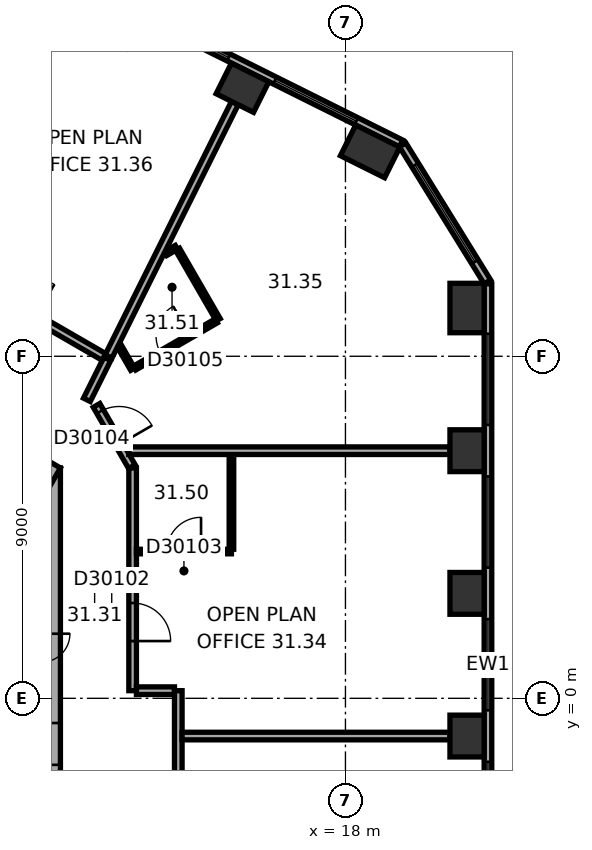
"""IFC4 building model, lengths in metres.
Left out: names, types, materials, properties, quantities, classifications, styles, units other than length and angle.
Written with IfcOpenShell. Run it as: python <this file> out.ifc"""

import sys

from ifc_helpers import new_model, si_unit, direction, frame, frame_2d, origin, origin_2d, place, context, subcontext, project, spatial, rectangle, extrude, element, fill, save


model = new_model("IFC4")
c1 = context("Model", 3, precision=1e-05, world=origin(), true_north=direction((0.0, 1.0)))
c2 = subcontext(c1, "Body", "Model", "MODEL_VIEW")
j1 = project(units=[si_unit("LENGTHUNIT", "METRE"), si_unit("PLANEANGLEUNIT", "RADIAN")], contexts=[c1])
p1 = place(None, origin())
s1 = spatial("IfcSite", under=j1, at=p1, CompositionType="ELEMENT")
p2 = place(p1, origin())
s2 = spatial("IfcBuilding", under=s1, at=p2, CompositionType="ELEMENT")
p3 = place(p2, frame((0.0, 0.0, 128.1)))
s3 = spatial("IfcBuildingStorey", under=s2, at=p3, CompositionType="ELEMENT", Elevation=128.1)
for number, where, z_axis, x_axis in (
    (1, (21.2, -0.993, 0.0), (0.0, 0.0, 1.0), (0.0, 1.0, 0.0)),
    (2, (21.2, 2.761, 0.0), (0.0, 0.0, 1.0), (0.0, 1.0, 0.0)),
    (3, (21.2, 6.515, 0.0), (0.0, 0.0, 1.0), (0.0, 1.0, 0.0)),
):
    element("IfcColumn", number, at=place(p3, frame(where, z_axis=z_axis, x_axis=x_axis)), inside=s3, PredefinedType="COLUMN", context=c2, shape_type="SweptSolid", body=[
        extrude(rectangle(XDim=1.1, YDim=0.9, at=origin_2d()), origin(), (0.0, 0.0, 1.0), 3.7),
    ])
for number, where, z_axis, x_axis in (
    (4, (21.2, 10.27, 0.0), (0.0, 0.0, 1.0), (0.0, 1.0, 0.0)),
    (5, (18.65, 14.39, 0.0), (0.0, 0.0, 1.0), (-0.895, 0.446, 0.0)),
):
    element("IfcColumn", number, at=place(p3, frame(where, z_axis=z_axis, x_axis=x_axis)), inside=s3, PredefinedType="COLUMN", context=c2, shape_type="SweptSolid", body=[
        extrude(rectangle(XDim=1.3, YDim=0.9, at=origin_2d()), origin(), (0.0, 0.0, 1.0), 3.7),
    ])
p4 = place(p3, frame((15.29, 16.065, 0.0), z_axis=(0.0, 0.0, 1.0), x_axis=(-0.894934361602, 0.44619781311, 0.0)))
e6 = element("IfcColumn", 6, at=p4, inside=s3, PredefinedType="COLUMN", context=c2, shape_type="SweptSolid", body=[
    extrude(rectangle(XDim=1.1, YDim=0.9, at=origin_2d()), origin(), (0.0, 0.0, 1.0), 3.7),
])
p5 = place(p3, frame((10.0, -6.062, 0.0), z_axis=(0.0, 0.0, 1.0), x_axis=(0.0, 1.0, 0.0)))
e7 = element("IfcWall", 7, at=p5, inside=s3, PredefinedType="SHEAR", context=c2, shape_type="SweptSolid", body=[
    extrude(rectangle(XDim=12.125, YDim=1.0, at=frame_2d((6.062, 0.0))), origin(), (0.0, 0.0, 1.0), 3.7),
])
p6 = place(p5, frame((6.262, 0.0, 0.0)))
e8 = element("IfcOpeningElement", 8, at=p6, cuts=e7, PredefinedType="OPENING", context=c2, shape_type="SweptSolid", body=[
    extrude(rectangle(XDim=1.5, YDim=2.1, at=frame_2d((0.75, 1.05))), frame((0.0, 0.51, 0.0), z_axis=(0.0, -1.0, 0.0), x_axis=(1.0, 0.0, 0.0)), (0.0, 0.0, 1.0), 1.02),
])
p7 = place(p5, frame((1.712, 0.0, 0.0)))
e9 = element("IfcOpeningElement", 9, at=p7, cuts=e7, PredefinedType="OPENING", context=c2, shape_type="SweptSolid", body=[
    extrude(rectangle(XDim=1.1, YDim=2.1, at=frame_2d((0.55, 1.05))), frame((0.0, 0.51, 0.0), z_axis=(0.0, -1.0, 0.0), x_axis=(1.0, 0.0, 0.0)), (0.0, 0.0, 1.0), 1.02),
])
p8 = place(p5, frame((4.312, 0.0, 0.0)))
e10 = element("IfcOpeningElement", 10, at=p8, cuts=e7, PredefinedType="OPENING", context=c2, shape_type="SweptSolid", body=[
    extrude(rectangle(XDim=1.1, YDim=2.1, at=frame_2d((0.55, 1.05))), frame((0.0, 0.51, 0.0), z_axis=(0.0, -1.0, 0.0), x_axis=(1.0, 0.0, 0.0)), (0.0, 0.0, 1.0), 1.02),
])
p9 = place(p3, frame((10.25, 5.629, 0.0), z_axis=(0.0, 0.0, 1.0), x_axis=(-0.866022616891, 0.50000482701, 0.0)))
e11 = element("IfcWall", 11, at=p9, inside=s3, PredefinedType="SHEAR", context=c2, shape_type="SweptSolid", body=[
    extrude(rectangle(XDim=12.125, YDim=1.0, at=frame_2d((6.062, 0.0))), origin(), (0.0, 0.0, 1.0), 3.7),
])
p10 = place(p9, frame((2.612, 0.0, 0.0)))
e12 = element("IfcOpeningElement", 12, at=p10, cuts=e11, PredefinedType="OPENING", context=c2, shape_type="SweptSolid", body=[
    extrude(rectangle(XDim=1.1, YDim=2.1, at=frame_2d((0.55, 1.05))), frame((0.0, 0.51, 0.0), z_axis=(0.0, -1.0, 0.0), x_axis=(1.0, 0.0, 0.0)), (0.0, 0.0, 1.0), 1.02),
])
p11 = place(p9, frame((5.212, 0.0, 0.0)))
e13 = element("IfcOpeningElement", 13, at=p11, cuts=e11, PredefinedType="OPENING", context=c2, shape_type="SweptSolid", body=[
    extrude(rectangle(XDim=1.1, YDim=2.1, at=frame_2d((0.55, 1.05))), frame((0.0, 0.51, 0.0), z_axis=(0.0, -1.0, 0.0), x_axis=(1.0, 0.0, 0.0)), (0.0, 0.0, 1.0), 1.02),
])
p12 = place(p9, frame((7.812, 0.0, 0.0)))
e14 = element("IfcOpeningElement", 14, at=p12, cuts=e11, PredefinedType="OPENING", context=c2, shape_type="SweptSolid", body=[
    extrude(rectangle(XDim=1.1, YDim=2.1, at=frame_2d((0.55, 1.05))), frame((0.0, 0.51, 0.0), z_axis=(0.0, -1.0, 0.0), x_axis=(1.0, 0.0, 0.0)), (0.0, 0.0, 1.0), 1.02),
])
p13 = place(p3, frame((21.75, -9.138, 0.0), z_axis=(0.0, 0.0, 1.0), x_axis=(0.0, 1.0, 0.0)))
e15 = element("IfcWall", 15, at=p13, inside=s3, PredefinedType="STANDARD", context=c2, shape_type="SweptSolid", body=[
    extrude(rectangle(XDim=20.044, YDim=0.2, at=frame_2d((10.022, 0.0))), origin(), (0.0, 0.0, 1.0), 3.7),
])
p14 = place(p13, frame((1.314, 0.0, 0.9)))
e16 = element("IfcOpeningElement", 16, at=p14, cuts=e15, PredefinedType="OPENING", context=c2, shape_type="SweptSolid", body=[
    extrude(rectangle(XDim=2.4, YDim=2.0, at=frame_2d((1.2, 1.0))), frame((0.0, 0.11, 0.0), z_axis=(0.0, -1.0, 0.0), x_axis=(1.0, 0.0, 0.0)), (0.0, 0.0, 1.0), 0.22),
])
p15 = place(p13, frame((5.069, 0.0, 0.9)))
e17 = element("IfcOpeningElement", 17, at=p15, cuts=e15, PredefinedType="OPENING", context=c2, shape_type="SweptSolid", body=[
    extrude(rectangle(XDim=2.4, YDim=2.0, at=frame_2d((1.2, 1.0))), frame((0.0, 0.11, 0.0), z_axis=(0.0, -1.0, 0.0), x_axis=(1.0, 0.0, 0.0)), (0.0, 0.0, 1.0), 0.22),
])
p16 = place(p13, frame((8.823, 0.0, 0.9)))
e18 = element("IfcOpeningElement", 18, at=p16, cuts=e15, PredefinedType="OPENING", context=c2, shape_type="SweptSolid", body=[
    extrude(rectangle(XDim=2.4, YDim=2.0, at=frame_2d((1.2, 1.0))), frame((0.0, 0.11, 0.0), z_axis=(0.0, -1.0, 0.0), x_axis=(1.0, 0.0, 0.0)), (0.0, 0.0, 1.0), 0.22),
])
p17 = place(p13, frame((12.577, 0.0, 0.9)))
e19 = element("IfcOpeningElement", 19, at=p17, cuts=e15, PredefinedType="OPENING", context=c2, shape_type="SweptSolid", body=[
    extrude(rectangle(XDim=2.4, YDim=2.0, at=frame_2d((1.2, 1.0))), frame((0.0, 0.11, 0.0), z_axis=(0.0, -1.0, 0.0), x_axis=(1.0, 0.0, 0.0)), (0.0, 0.0, 1.0), 0.22),
])
p18 = place(p13, frame((16.331, 0.0, 0.9)))
e20 = element("IfcOpeningElement", 20, at=p18, cuts=e15, PredefinedType="OPENING", context=c2, shape_type="SweptSolid", body=[
    extrude(rectangle(XDim=2.4, YDim=2.0, at=frame_2d((1.2, 1.0))), frame((0.0, 0.11, 0.0), z_axis=(0.0, -1.0, 0.0), x_axis=(1.0, 0.0, 0.0)), (0.0, 0.0, 1.0), 0.22),
])
p19 = place(p3, frame((21.735, 10.958, 0.0), z_axis=(0.0, 0.0, 1.0), x_axis=(-0.526213807775, 0.850352296702, 0.0)))
e21 = element("IfcWall", 21, at=p19, inside=s3, PredefinedType="STANDARD", context=c2, shape_type="SweptSolid", body=[
    extrude(rectangle(XDim=4.238, YDim=0.2, at=frame_2d((2.119, 0.0))), origin(), (0.0, 0.0, 1.0), 3.7),
])
p20 = place(p19, frame((0.619, 0.0, 0.9)))
e22 = element("IfcOpeningElement", 22, at=p20, cuts=e21, PredefinedType="OPENING", context=c2, shape_type="SweptSolid", body=[
    extrude(rectangle(XDim=3.0, YDim=2.0, at=frame_2d((1.5, 1.0))), frame((0.0, 0.11, 0.0), z_axis=(0.0, -1.0, 0.0), x_axis=(1.0, 0.0, 0.0)), (0.0, 0.0, 1.0), 0.22),
])
p21 = place(p3, frame((19.464, 14.599, 0.0), z_axis=(0.0, 0.0, 1.0), x_axis=(-0.894935755043, 0.446195018289, 0.0)))
e23 = element("IfcWall", 23, at=p21, inside=s3, PredefinedType="STANDARD", context=c2, shape_type="SweptSolid", body=[
    extrude(rectangle(XDim=20.044, YDim=0.2, at=frame_2d((10.022, 0.0))), origin(), (0.0, 0.0, 1.0), 3.7),
])
p22 = place(p21, frame((1.313, 0.0, 0.9)))
e24 = element("IfcOpeningElement", 24, at=p22, cuts=e23, PredefinedType="OPENING", context=c2, shape_type="SweptSolid", body=[
    extrude(rectangle(XDim=2.4, YDim=2.0, at=frame_2d((1.2, 1.0))), frame((0.0, 0.11, 0.0), z_axis=(0.0, -1.0, 0.0), x_axis=(1.0, 0.0, 0.0)), (0.0, 0.0, 1.0), 0.22),
])
p23 = place(p21, frame((5.067, 0.0, 0.9)))
e25 = element("IfcOpeningElement", 25, at=p23, cuts=e23, PredefinedType="OPENING", context=c2, shape_type="SweptSolid", body=[
    extrude(rectangle(XDim=2.4, YDim=2.0, at=frame_2d((1.2, 1.0))), frame((0.0, 0.11, 0.0), z_axis=(0.0, -1.0, 0.0), x_axis=(1.0, 0.0, 0.0)), (0.0, 0.0, 1.0), 0.22),
])
p24 = place(p21, frame((8.821, 0.0, 0.9)))
e26 = element("IfcOpeningElement", 26, at=p24, cuts=e23, PredefinedType="OPENING", context=c2, shape_type="SweptSolid", body=[
    extrude(rectangle(XDim=2.4, YDim=2.0, at=frame_2d((1.2, 1.0))), frame((0.0, 0.11, 0.0), z_axis=(0.0, -1.0, 0.0), x_axis=(1.0, 0.0, 0.0)), (0.0, 0.0, 1.0), 0.22),
])
p25 = place(p21, frame((12.575, 0.0, 0.9)))
e27 = element("IfcOpeningElement", 27, at=p25, cuts=e23, PredefinedType="OPENING", context=c2, shape_type="SweptSolid", body=[
    extrude(rectangle(XDim=2.4, YDim=2.0, at=frame_2d((1.2, 1.0))), frame((0.0, 0.11, 0.0), z_axis=(0.0, -1.0, 0.0), x_axis=(1.0, 0.0, 0.0)), (0.0, 0.0, 1.0), 0.22),
])
p26 = place(p21, frame((16.329, 0.0, 0.9)))
e28 = element("IfcOpeningElement", 28, at=p26, cuts=e23, PredefinedType="OPENING", context=c2, shape_type="SweptSolid", body=[
    extrude(rectangle(XDim=2.4, YDim=2.0, at=frame_2d((1.2, 1.0))), frame((0.0, 0.11, 0.0), z_axis=(0.0, -1.0, 0.0), x_axis=(1.0, 0.0, 0.0)), (0.0, 0.0, 1.0), 0.22),
])
p27 = place(p3, frame((11.196, 7.854, 0.0), z_axis=(0.0, 0.0, 1.0), x_axis=(0.446241040303, 0.894912808015, 0.0)))
e29 = element("IfcWall", 29, at=p27, inside=s3, PredefinedType="PARTITIONING", context=c2, shape_type="SweptSolid", body=[
    extrude(rectangle(XDim=1.205, YDim=0.2, at=frame_2d((0.603, 0.0))), origin(), (0.0, 0.0, 1.0), 3.42),
])
p28 = place(p3, frame((11.646, 8.981, 0.0), z_axis=(0.0, 0.0, 1.0), x_axis=(-0.866027142779, 0.499996987961, 0.0)))
e30 = element("IfcWall", 30, at=p28, inside=s3, PredefinedType="PARTITIONING", context=c2, shape_type="SweptSolid", body=[
    extrude(rectangle(XDim=9.597, YDim=0.2, at=frame_2d((4.798, 0.0))), origin(), (0.0, 0.0, 1.0), 3.42),
])
p29 = place(p28, frame((2.086, 0.0, 0.0)))
e31 = element("IfcOpeningElement", 31, at=p29, cuts=e30, PredefinedType="OPENING", context=c2, shape_type="SweptSolid", body=[
    extrude(rectangle(XDim=1.0, YDim=2.1, at=frame_2d((0.5, 1.05))), frame((0.0, 0.11, 0.0), z_axis=(0.0, -1.0, 0.0), x_axis=(1.0, 0.0, 0.0)), (0.0, 0.0, 1.0), 0.22),
])
p30 = place(p28, frame((8.01, 0.0, 0.0)))
e32 = element("IfcOpeningElement", 32, at=p30, cuts=e30, PredefinedType="OPENING", context=c2, shape_type="SweptSolid", body=[
    extrude(rectangle(XDim=1.0, YDim=2.1, at=frame_2d((0.5, 1.05))), frame((0.0, 0.11, 0.0), z_axis=(0.0, -1.0, 0.0), x_axis=(1.0, 0.0, 0.0)), (0.0, 0.0, 1.0), 0.22),
])
p31 = place(p3, frame((12.38, 6.097, 0.0), z_axis=(0.0, 0.0, 1.0), x_axis=(-0.499964847546, 0.866045698112, 0.0)))
e33 = element("IfcWall", 33, at=p31, inside=s3, PredefinedType="PARTITIONING", context=c2, shape_type="SweptSolid", body=[
    extrude(rectangle(XDim=1.86, YDim=0.2, at=frame_2d((0.93, 0.0))), origin(), (0.0, 0.0, 1.0), 3.42),
])
p32 = place(p31, frame((0.672, 0.0, 0.0)))
e34 = element("IfcOpeningElement", 34, at=p32, cuts=e33, PredefinedType="OPENING", context=c2, shape_type="SweptSolid", body=[
    extrude(rectangle(XDim=1.0, YDim=2.1, at=frame_2d((0.5, 1.05))), frame((0.0, 0.11, 0.0), z_axis=(0.0, -1.0, 0.0), x_axis=(1.0, 0.0, 0.0)), (0.0, 0.0, 1.0), 0.22),
])
p33 = place(p3, frame((12.4, 0.201, 0.0), z_axis=(0.0, 0.0, 1.0), x_axis=(0.0, 1.0, 0.0)))
e35 = element("IfcWall", 35, at=p33, inside=s3, PredefinedType="PARTITIONING", context=c2, shape_type="SweptSolid", body=[
    extrude(rectangle(XDim=5.861, YDim=0.2, at=frame_2d((2.931, 0.0))), origin(), (0.0, 0.0, 1.0), 3.42),
])
p34 = place(p33, frame((1.306, 0.0, 0.0)))
e36 = element("IfcOpeningElement", 36, at=p34, cuts=e35, PredefinedType="OPENING", context=c2, shape_type="SweptSolid", body=[
    extrude(rectangle(XDim=1.0, YDim=2.1, at=frame_2d((0.5, 1.05))), frame((0.0, 0.11, 0.0), z_axis=(0.0, -1.0, 0.0), x_axis=(1.0, 0.0, 0.0)), (0.0, 0.0, 1.0), 0.22),
])
p35 = place(p3, frame((12.401, 8.661, 0.0), z_axis=(0.0, 0.0, 1.0), x_axis=(-0.499831418649, 0.866122712398, 0.0)))
e37 = element("IfcWall", 37, at=p35, inside=s3, PredefinedType="PARTITIONING", context=c2, shape_type="SweptSolid", body=[
    extrude(rectangle(XDim=0.711, YDim=0.12, at=frame_2d((0.355, 0.0))), origin(), (0.0, 0.0, 1.0), 3.42),
])
p36 = place(p3, frame((13.269, 11.702, 0.0), z_axis=(0.0, 0.0, 1.0), x_axis=(0.865936922628, 0.500153222552, 0.0)))
e38 = element("IfcWall", 38, at=p36, inside=s3, PredefinedType="PARTITIONING", context=c2, shape_type="SweptSolid", body=[
    extrude(rectangle(XDim=0.327, YDim=0.12, at=frame_2d((0.164, 0.0))), origin(), (0.0, 0.0, 1.0), 3.42),
])
p37 = place(p3, frame((13.501, 0.201, 0.0), z_axis=(0.0, 0.0, 1.0), x_axis=(-1.0, 0.0, 0.0)))
e39 = element("IfcWall", 39, at=p37, inside=s3, PredefinedType="PARTITIONING", context=c2, shape_type="SweptSolid", body=[
    extrude(rectangle(XDim=1.001, YDim=0.2, at=frame_2d((0.5, 0.0))), origin(), (0.0, 0.0, 1.0), 3.42),
])
p38 = place(p3, frame((13.583, 11.814, 0.0), z_axis=(0.0, 0.0, 1.0), x_axis=(0.500028586798, -0.86600889856, 0.0)))
e40 = element("IfcWall", 40, at=p38, inside=s3, PredefinedType="PARTITIONING", context=c2, shape_type="SweptSolid", body=[
    extrude(rectangle(XDim=2.14, YDim=0.12, at=frame_2d((1.07, 0.0))), origin(), (0.0, 0.0, 1.0), 3.42),
])
p39 = place(p3, frame((13.601, -5.501, 0.0), z_axis=(0.0, 0.0, 1.0), x_axis=(0.0, 1.0, 0.0)))
e41 = element("IfcWall", 41, at=p39, inside=s3, PredefinedType="PARTITIONING", context=c2, shape_type="SweptSolid", body=[
    extrude(rectangle(XDim=5.702, YDim=0.2, at=frame_2d((2.851, 0.0))), origin(), (0.0, 0.0, 1.0), 3.42),
])
p40 = place(p39, frame((2.131, 0.0, 0.0)))
e42 = element("IfcOpeningElement", 42, at=p40, cuts=e41, PredefinedType="OPENING", context=c2, shape_type="SweptSolid", body=[
    extrude(rectangle(XDim=1.0, YDim=2.1, at=frame_2d((0.5, 1.05))), frame((0.0, 0.11, 0.0), z_axis=(0.0, -1.0, 0.0), x_axis=(1.0, 0.0, 0.0)), (0.0, 0.0, 1.0), 0.22),
])
p41 = place(p3, frame((14.601, 9.931, 0.0), z_axis=(0.0, 0.0, 1.0), x_axis=(-0.866023285932, -0.50000366821, 0.0)))
e43 = element("IfcWall", 43, at=p41, inside=s3, PredefinedType="PARTITIONING", context=c2, shape_type="SweptSolid", body=[
    extrude(rectangle(XDim=2.48, YDim=0.12, at=frame_2d((1.24, 0.0))), origin(), (0.0, 0.0, 1.0), 3.42),
])
p42 = place(p41, frame((0.79, 0.0, 0.0)))
e44 = element("IfcOpeningElement", 44, at=p42, cuts=e43, PredefinedType="OPENING", context=c2, shape_type="SweptSolid", body=[
    extrude(rectangle(XDim=0.9, YDim=2.1, at=frame_2d((0.45, 1.05))), frame((0.0, 0.07, 0.0), z_axis=(0.0, -1.0, 0.0), x_axis=(1.0, 0.0, 0.0)), (0.0, 0.0, 1.0), 0.14),
])
p43 = place(p3, frame((15.0, 3.862, 0.0), z_axis=(0.0, 0.0, 1.0), x_axis=(-1.0, 0.0, 0.0)))
e45 = element("IfcWall", 45, at=p43, inside=s3, PredefinedType="PARTITIONING", context=c2, shape_type="SweptSolid", body=[
    extrude(rectangle(XDim=2.5, YDim=0.12, at=frame_2d((1.25, 0.0))), origin(), (0.0, 0.0, 1.0), 3.42),
])
p44 = place(p43, frame((0.8, 0.0, 0.0)))
e46 = element("IfcOpeningElement", 46, at=p44, cuts=e45, PredefinedType="OPENING", context=c2, shape_type="SweptSolid", body=[
    extrude(rectangle(XDim=0.9, YDim=2.1, at=frame_2d((0.45, 1.05))), frame((0.0, 0.07, 0.0), z_axis=(0.0, -1.0, 0.0), x_axis=(1.0, 0.0, 0.0)), (0.0, 0.0, 1.0), 0.14),
])
p45 = place(p3, frame((15.0, 6.415, 0.0), z_axis=(0.0, 0.0, 1.0), x_axis=(0.0, -1.0, 0.0)))
e47 = element("IfcWall", 47, at=p45, inside=s3, PredefinedType="PARTITIONING", context=c2, shape_type="SweptSolid", body=[
    extrude(rectangle(XDim=2.493, YDim=0.12, at=frame_2d((1.247, 0.0))), origin(), (0.0, 0.0, 1.0), 3.42),
])
p46 = place(p3, frame((15.09, 15.663, 0.0), z_axis=(0.0, 0.0, 1.0), x_axis=(-0.446203977428, -0.89493128816, 0.0)))
e48 = element("IfcWall", 48, at=p46, inside=s3, PredefinedType="PARTITIONING", context=c2, shape_type="SweptSolid", body=[
    extrude(rectangle(XDim=7.45, YDim=0.2, at=frame_2d((3.725, 0.0))), origin(), (0.0, 0.0, 1.0), 3.42),
])
p47 = place(p3, frame((20.75, -0.993, 0.0), z_axis=(0.0, 0.0, 1.0), x_axis=(-1.0, 0.0, 0.0)))
e49 = element("IfcWall", 49, at=p47, inside=s3, PredefinedType="PARTITIONING", context=c2, shape_type="SweptSolid", body=[
    extrude(rectangle(XDim=7.049, YDim=0.2, at=frame_2d((3.524, 0.0))), origin(), (0.0, 0.0, 1.0), 2.87),
])
p48 = place(p3, frame((20.75, 6.515, 0.0), z_axis=(0.0, 0.0, 1.0), x_axis=(-1.0, 0.0, 0.0)))
e50 = element("IfcWall", 50, at=p48, inside=s3, PredefinedType="PARTITIONING", context=c2, shape_type="SweptSolid", body=[
    extrude(rectangle(XDim=8.452, YDim=0.2, at=frame_2d((4.226, 0.0))), origin(), (0.0, 0.0, 1.0), 3.42),
])
p49 = place(p15, origin())
e51 = element("IfcWindow", 51, at=p49, inside=s3, PartitioningType="SINGLE_PANEL", PredefinedType="WINDOW", context=c2, shape_type="SweptSolid", body=[
    extrude(rectangle(XDim=2.4, YDim=2.0, at=frame_2d((1.2, 1.0))), frame((0.0, 0.03, 0.0), z_axis=(0.0, -1.0, 0.0), x_axis=(1.0, 0.0, 0.0)), (0.0, 0.0, 1.0), 0.06),
])
fill(e17, e51)
p50 = place(p16, origin())
e52 = element("IfcWindow", 52, at=p50, inside=s3, PartitioningType="SINGLE_PANEL", PredefinedType="WINDOW", context=c2, shape_type="SweptSolid", body=[
    extrude(rectangle(XDim=2.4, YDim=2.0, at=frame_2d((1.2, 1.0))), frame((0.0, 0.03, 0.0), z_axis=(0.0, -1.0, 0.0), x_axis=(1.0, 0.0, 0.0)), (0.0, 0.0, 1.0), 0.06),
])
fill(e18, e52)
p51 = place(p17, origin())
e53 = element("IfcWindow", 53, at=p51, inside=s3, PartitioningType="SINGLE_PANEL", PredefinedType="WINDOW", context=c2, shape_type="SweptSolid", body=[
    extrude(rectangle(XDim=2.4, YDim=2.0, at=frame_2d((1.2, 1.0))), frame((0.0, 0.03, 0.0), z_axis=(0.0, -1.0, 0.0), x_axis=(1.0, 0.0, 0.0)), (0.0, 0.0, 1.0), 0.06),
])
fill(e19, e53)
p52 = place(p18, origin())
e54 = element("IfcWindow", 54, at=p52, inside=s3, PartitioningType="SINGLE_PANEL", PredefinedType="WINDOW", context=c2, shape_type="SweptSolid", body=[
    extrude(rectangle(XDim=2.4, YDim=2.0, at=frame_2d((1.2, 1.0))), frame((0.0, 0.03, 0.0), z_axis=(0.0, -1.0, 0.0), x_axis=(1.0, 0.0, 0.0)), (0.0, 0.0, 1.0), 0.06),
])
fill(e20, e54)
p53 = place(p20, origin())
e55 = element("IfcWindow", 55, at=p53, inside=s3, PartitioningType="SINGLE_PANEL", PredefinedType="WINDOW", context=c2, shape_type="SweptSolid", body=[
    extrude(rectangle(XDim=3.0, YDim=2.0, at=frame_2d((1.5, 1.0))), frame((0.0, 0.03, 0.0), z_axis=(0.0, -1.0, 0.0), x_axis=(1.0, 0.0, 0.0)), (0.0, 0.0, 1.0), 0.06),
])
fill(e22, e55)
p54 = place(p22, origin())
e56 = element("IfcWindow", 56, at=p54, inside=s3, PartitioningType="SINGLE_PANEL", PredefinedType="WINDOW", context=c2, shape_type="SweptSolid", body=[
    extrude(rectangle(XDim=2.4, YDim=2.0, at=frame_2d((1.2, 1.0))), frame((0.0, 0.03, 0.0), z_axis=(0.0, -1.0, 0.0), x_axis=(1.0, 0.0, 0.0)), (0.0, 0.0, 1.0), 0.06),
])
fill(e24, e56)
p55 = place(p23, origin())
e57 = element("IfcWindow", 57, at=p55, inside=s3, PartitioningType="SINGLE_PANEL", PredefinedType="WINDOW", context=c2, shape_type="SweptSolid", body=[
    extrude(rectangle(XDim=2.4, YDim=2.0, at=frame_2d((1.2, 1.0))), frame((0.0, 0.03, 0.0), z_axis=(0.0, -1.0, 0.0), x_axis=(1.0, 0.0, 0.0)), (0.0, 0.0, 1.0), 0.06),
])
fill(e25, e57)
p56 = place(p34, origin())
e58 = element("IfcDoor", 58, at=p56, inside=s3, OperationType="SINGLE_SWING_LEFT", PredefinedType="DOOR", context=c2, shape_type="SweptSolid", body=[
    extrude(rectangle(XDim=1.0, YDim=2.1, at=frame_2d((0.5, 1.05))), frame((0.0, 0.025, 0.0), z_axis=(0.0, -1.0, 0.0), x_axis=(1.0, 0.0, 0.0)), (0.0, 0.0, 1.0), 0.05),
])
fill(e36, e58)
p57 = place(p44, origin())
e59 = element("IfcDoor", 59, at=p57, inside=s3, OperationType="SINGLE_SWING_LEFT", PredefinedType="DOOR", context=c2, shape_type="SweptSolid", body=[
    extrude(rectangle(XDim=0.9, YDim=2.1, at=frame_2d((0.45, 1.05))), frame((0.0, 0.025, 0.0), z_axis=(0.0, -1.0, 0.0), x_axis=(1.0, 0.0, 0.0)), (0.0, 0.0, 1.0), 0.05),
])
fill(e46, e59)
p58 = place(p32, origin())
e60 = element("IfcDoor", 60, at=p58, inside=s3, OperationType="SINGLE_SWING_LEFT", PredefinedType="DOOR", context=c2, shape_type="SweptSolid", body=[
    extrude(rectangle(XDim=1.0, YDim=2.1, at=frame_2d((0.5, 1.05))), frame((0.0, 0.025, 0.0), z_axis=(0.0, -1.0, 0.0), x_axis=(1.0, 0.0, 0.0)), (0.0, 0.0, 1.0), 0.05),
])
fill(e34, e60)
p59 = place(p42, origin())
e61 = element("IfcDoor", 61, at=p59, inside=s3, OperationType="SINGLE_SWING_LEFT", PredefinedType="DOOR", context=c2, shape_type="SweptSolid", body=[
    extrude(rectangle(XDim=0.9, YDim=2.1, at=frame_2d((0.45, 1.05))), frame((0.0, 0.025, 0.0), z_axis=(0.0, -1.0, 0.0), x_axis=(1.0, 0.0, 0.0)), (0.0, 0.0, 1.0), 0.05),
])
fill(e44, e61)
save(model, sys.argv[1])
